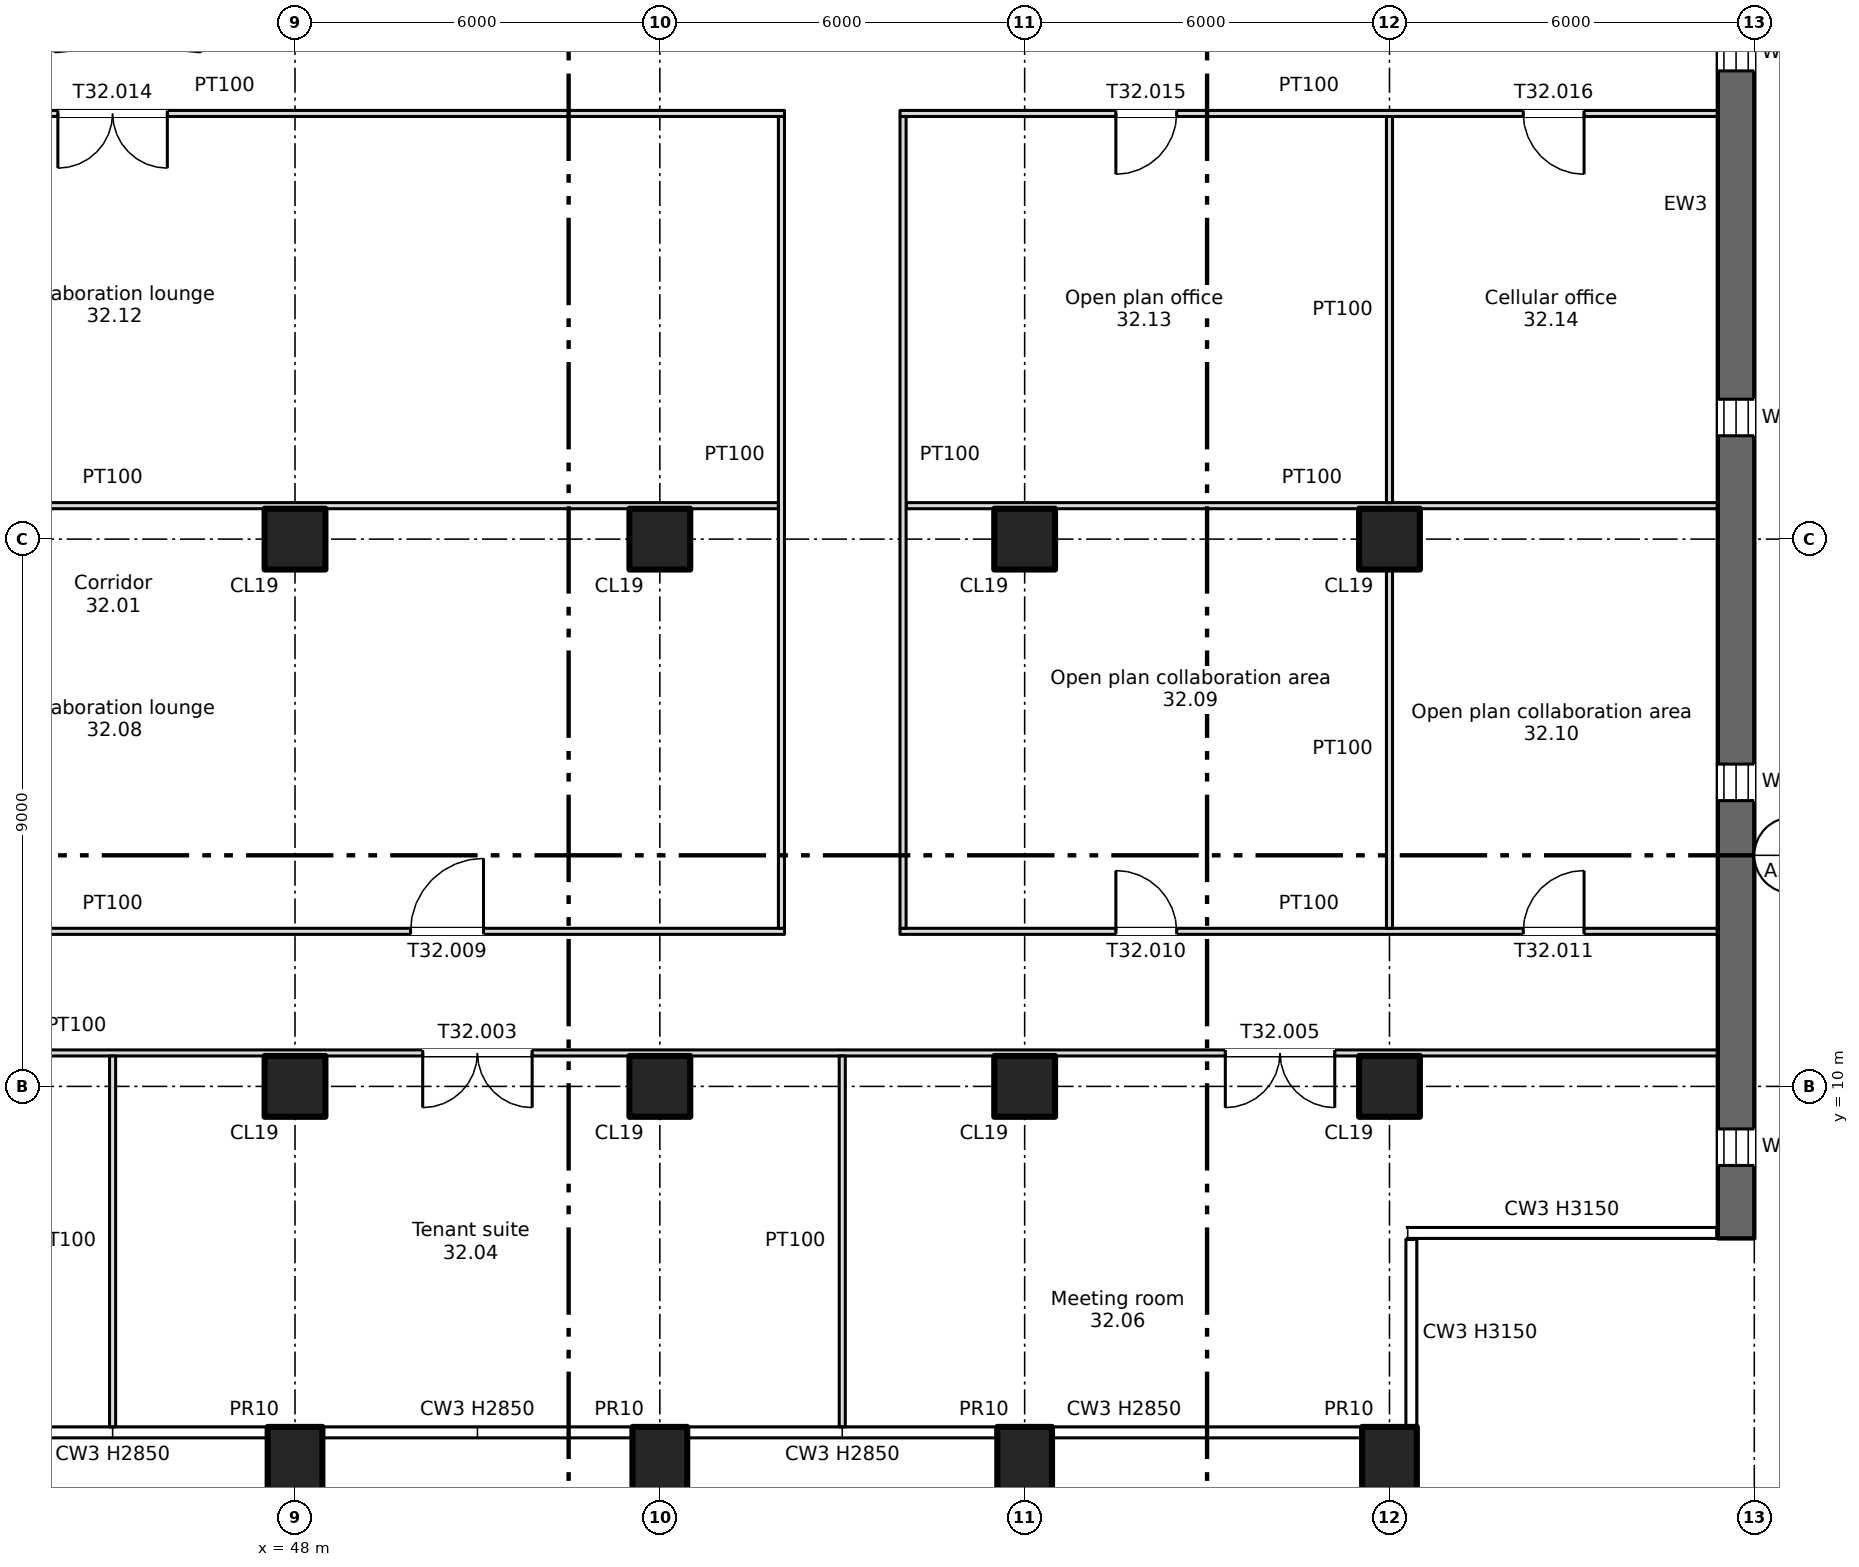
"""IFC4 building model, lengths in metres.
Left out: names, types, materials, properties, quantities, classifications, styles, units other than length and angle.
Written with IfcOpenShell. Run it as: python <this file> out.ifc"""

import sys

from ifc_helpers import new_model, si_unit, direction, frame, frame_2d, origin, origin_2d, place, context, subcontext, project, spatial, rectangle, extrude, element, fill, save


model = new_model("IFC4")
c1 = context("Model", 3, precision=1e-05, world=origin(), true_north=direction((0.0, 1.0)))
c2 = subcontext(c1, "Body", "Model", "MODEL_VIEW")
j1 = project(units=[si_unit("LENGTHUNIT", "METRE"), si_unit("PLANEANGLEUNIT", "RADIAN")], contexts=[c1])
p1 = place(None, origin())
s1 = spatial("IfcSite", under=j1, at=p1, CompositionType="ELEMENT")
p2 = place(p1, origin())
s2 = spatial("IfcBuilding", under=s1, at=p2, CompositionType="ELEMENT")
p3 = place(p2, frame((0.0, 0.0, 223.0)))
s3 = spatial("IfcBuildingStorey", under=s2, at=p3, CompositionType="ELEMENT", Elevation=223.0)
for number, where, z_axis, x_axis in (
    (1, (48.0, 3.7, -0.4), (0.0, 0.0, 1.0), (1.0, 0.0, 0.0)),
    (2, (54.0, 3.7, -0.4), (0.0, 0.0, 1.0), (1.0, 0.0, 0.0)),
    (3, (60.0, 3.7, -0.4), (0.0, 0.0, 1.0), (1.0, 0.0, 0.0)),
    (4, (66.0, 3.7, -0.4), (0.0, 0.0, 1.0), (1.0, 0.0, 0.0)),
):
    element("IfcColumn", number, at=place(p3, frame(where, z_axis=z_axis, x_axis=x_axis)), inside=s3, PredefinedType="COLUMN", context=c2, shape_type="SweptSolid", body=[
        extrude(rectangle(XDim=0.9, YDim=1.4, at=origin_2d()), origin(), (0.0, 0.0, 1.0), 3.55),
    ])
for number, where, z_axis, x_axis in (
    (5, (48.0, 10.0, 0.0), (0.0, 0.0, 1.0), (1.0, 0.0, 0.0)),
    (6, (48.0, 19.0, 0.0), (0.0, 0.0, 1.0), (1.0, 0.0, 0.0)),
    (7, (54.0, 10.0, 0.0), (0.0, 0.0, 1.0), (1.0, 0.0, 0.0)),
    (8, (54.0, 19.0, 0.0), (0.0, 0.0, 1.0), (1.0, 0.0, 0.0)),
    (9, (60.0, 10.0, 0.0), (0.0, 0.0, 1.0), (1.0, 0.0, 0.0)),
    (10, (60.0, 19.0, 0.0), (0.0, 0.0, 1.0), (1.0, 0.0, 0.0)),
    (11, (66.0, 10.0, 0.0), (0.0, 0.0, 1.0), (1.0, 0.0, 0.0)),
    (12, (66.0, 19.0, 0.0), (0.0, 0.0, 1.0), (1.0, 0.0, 0.0)),
):
    element("IfcColumn", number, at=place(p3, frame(where, z_axis=z_axis, x_axis=x_axis)), inside=s3, PredefinedType="COLUMN", context=c2, shape_type="SweptSolid", body=[
        extrude(rectangle(XDim=1.0, YDim=1.0, at=origin_2d()), origin(), (0.0, 0.0, 1.0), 3.15),
    ])
p4 = place(p3, frame((71.7, 7.5, 0.0), z_axis=(0.0, 0.0, 1.0), x_axis=(0.0, 1.0, 0.0)))
e13 = element("IfcWall", 13, at=p4, inside=s3, PredefinedType="SHEAR", context=c2, shape_type="SweptSolid", body=[
    extrude(rectangle(XDim=34.0, YDim=0.6, at=frame_2d((17.0, 0.0))), origin(), (0.0, 0.0, 1.0), 3.15),
])
p5 = place(p4, frame((1.2, 0.0, 0.6)))
e14 = element("IfcOpeningElement", 14, at=p5, cuts=e13, PredefinedType="OPENING", context=c2, shape_type="SweptSolid", body=[
    extrude(rectangle(XDim=0.6, YDim=2.4, at=frame_2d((0.3, 1.2))), frame((0.0, 0.31, 0.0), z_axis=(0.0, -1.0, 0.0), x_axis=(1.0, 0.0, 0.0)), (0.0, 0.0, 1.0), 0.62),
])
p6 = place(p4, frame((7.2, 0.0, 0.6)))
e15 = element("IfcOpeningElement", 15, at=p6, cuts=e13, PredefinedType="OPENING", context=c2, shape_type="SweptSolid", body=[
    extrude(rectangle(XDim=0.6, YDim=2.4, at=frame_2d((0.3, 1.2))), frame((0.0, 0.31, 0.0), z_axis=(0.0, -1.0, 0.0), x_axis=(1.0, 0.0, 0.0)), (0.0, 0.0, 1.0), 0.62),
])
p7 = place(p4, frame((13.2, 0.0, 0.6)))
e16 = element("IfcOpeningElement", 16, at=p7, cuts=e13, PredefinedType="OPENING", context=c2, shape_type="SweptSolid", body=[
    extrude(rectangle(XDim=0.6, YDim=2.4, at=frame_2d((0.3, 1.2))), frame((0.0, 0.31, 0.0), z_axis=(0.0, -1.0, 0.0), x_axis=(1.0, 0.0, 0.0)), (0.0, 0.0, 1.0), 0.62),
])
p8 = place(p4, frame((19.2, 0.0, 0.6)))
e17 = element("IfcOpeningElement", 17, at=p8, cuts=e13, PredefinedType="OPENING", context=c2, shape_type="SweptSolid", body=[
    extrude(rectangle(XDim=0.6, YDim=2.4, at=frame_2d((0.3, 1.2))), frame((0.0, 0.31, 0.0), z_axis=(0.0, -1.0, 0.0), x_axis=(1.0, 0.0, 0.0)), (0.0, 0.0, 1.0), 0.62),
])
p9 = place(p4, frame((25.2, 0.0, 0.6)))
e18 = element("IfcOpeningElement", 18, at=p9, cuts=e13, PredefinedType="OPENING", context=c2, shape_type="SweptSolid", body=[
    extrude(rectangle(XDim=0.6, YDim=2.4, at=frame_2d((0.3, 1.2))), frame((0.0, 0.31, 0.0), z_axis=(0.0, -1.0, 0.0), x_axis=(1.0, 0.0, 0.0)), (0.0, 0.0, 1.0), 0.62),
])
p10 = place(p4, frame((31.2, 0.0, 0.6)))
e19 = element("IfcOpeningElement", 19, at=p10, cuts=e13, PredefinedType="OPENING", context=c2, shape_type="SweptSolid", body=[
    extrude(rectangle(XDim=0.6, YDim=2.4, at=frame_2d((0.3, 1.2))), frame((0.0, 0.31, 0.0), z_axis=(0.0, -1.0, 0.0), x_axis=(1.0, 0.0, 0.0)), (0.0, 0.0, 1.0), 0.62),
])
p11 = place(p3, frame((6.6, 10.55, 0.0), z_axis=(0.0, 0.0, 1.0), x_axis=(1.0, 0.0, 0.0)))
e20 = element("IfcWall", 20, at=p11, inside=s3, PredefinedType="PARTITIONING", context=c2, shape_type="SweptSolid", body=[
    extrude(rectangle(XDim=64.8, YDim=0.1, at=frame_2d((32.4, 0.0))), origin(), (0.0, 0.0, 1.0), 3.15),
])
p12 = place(p11, frame((19.5, 0.0, 0.0)))
e21 = element("IfcOpeningElement", 21, at=p12, cuts=e20, PredefinedType="OPENING", context=c2, shape_type="SweptSolid", body=[
    extrude(rectangle(XDim=1.8, YDim=2.1, at=frame_2d((0.9, 1.05))), frame((0.0, 0.06, 0.0), z_axis=(0.0, -1.0, 0.0), x_axis=(1.0, 0.0, 0.0)), (0.0, 0.0, 1.0), 0.12),
])
p13 = place(p11, frame((31.5, 0.0, 0.0)))
e22 = element("IfcOpeningElement", 22, at=p13, cuts=e20, PredefinedType="OPENING", context=c2, shape_type="SweptSolid", body=[
    extrude(rectangle(XDim=1.8, YDim=2.1, at=frame_2d((0.9, 1.05))), frame((0.0, 0.06, 0.0), z_axis=(0.0, -1.0, 0.0), x_axis=(1.0, 0.0, 0.0)), (0.0, 0.0, 1.0), 0.12),
])
p14 = place(p11, frame((43.5, 0.0, 0.0)))
e23 = element("IfcOpeningElement", 23, at=p14, cuts=e20, PredefinedType="OPENING", context=c2, shape_type="SweptSolid", body=[
    extrude(rectangle(XDim=1.8, YDim=2.1, at=frame_2d((0.9, 1.05))), frame((0.0, 0.06, 0.0), z_axis=(0.0, -1.0, 0.0), x_axis=(1.0, 0.0, 0.0)), (0.0, 0.0, 1.0), 0.12),
])
p15 = place(p11, frame((6.3, 0.0, 0.0)))
e24 = element("IfcOpeningElement", 24, at=p15, cuts=e20, PredefinedType="OPENING", context=c2, shape_type="SweptSolid", body=[
    extrude(rectangle(XDim=1.8, YDim=2.1, at=frame_2d((0.9, 1.05))), frame((0.0, 0.06, 0.0), z_axis=(0.0, -1.0, 0.0), x_axis=(1.0, 0.0, 0.0)), (0.0, 0.0, 1.0), 0.12),
])
p16 = place(p11, frame((56.7, 0.0, 0.0)))
e25 = element("IfcOpeningElement", 25, at=p16, cuts=e20, PredefinedType="OPENING", context=c2, shape_type="SweptSolid", body=[
    extrude(rectangle(XDim=1.8, YDim=2.1, at=frame_2d((0.9, 1.05))), frame((0.0, 0.06, 0.0), z_axis=(0.0, -1.0, 0.0), x_axis=(1.0, 0.0, 0.0)), (0.0, 0.0, 1.0), 0.12),
])
p17 = place(p3, frame((33.95, 12.55, 0.0), z_axis=(0.0, 0.0, 1.0), x_axis=(1.0, 0.0, 0.0)))
e26 = element("IfcWall", 26, at=p17, inside=s3, PredefinedType="PARTITIONING", context=c2, shape_type="SweptSolid", body=[
    extrude(rectangle(XDim=22.1, YDim=0.1, at=frame_2d((11.05, 0.0))), origin(), (0.0, 0.0, 1.0), 3.15),
])
p18 = place(p17, frame((4.95, 0.0, 0.0)))
e27 = element("IfcOpeningElement", 27, at=p18, cuts=e26, PredefinedType="OPENING", context=c2, shape_type="SweptSolid", body=[
    extrude(rectangle(XDim=1.2, YDim=2.1, at=frame_2d((0.6, 1.05))), frame((0.0, 0.06, 0.0), z_axis=(0.0, -1.0, 0.0), x_axis=(1.0, 0.0, 0.0)), (0.0, 0.0, 1.0), 0.12),
])
p19 = place(p17, frame((15.95, 0.0, 0.0)))
e28 = element("IfcOpeningElement", 28, at=p19, cuts=e26, PredefinedType="OPENING", context=c2, shape_type="SweptSolid", body=[
    extrude(rectangle(XDim=1.2, YDim=2.1, at=frame_2d((0.6, 1.05))), frame((0.0, 0.06, 0.0), z_axis=(0.0, -1.0, 0.0), x_axis=(1.0, 0.0, 0.0)), (0.0, 0.0, 1.0), 0.12),
])
p20 = place(p3, frame((57.95, 12.55, 0.0), z_axis=(0.0, 0.0, 1.0), x_axis=(1.0, 0.0, 0.0)))
e29 = element("IfcWall", 29, at=p20, inside=s3, PredefinedType="PARTITIONING", context=c2, shape_type="SweptSolid", body=[
    extrude(rectangle(XDim=13.45, YDim=0.1, at=frame_2d((6.725, 0.0))), origin(), (0.0, 0.0, 1.0), 3.15),
])
p21 = place(p20, frame((3.55, 0.0, 0.0)))
e30 = element("IfcOpeningElement", 30, at=p21, cuts=e29, PredefinedType="OPENING", context=c2, shape_type="SweptSolid", body=[
    extrude(rectangle(XDim=1.0, YDim=2.1, at=frame_2d((0.5, 1.05))), frame((0.0, 0.06, 0.0), z_axis=(0.0, -1.0, 0.0), x_axis=(1.0, 0.0, 0.0)), (0.0, 0.0, 1.0), 0.12),
])
p22 = place(p20, frame((10.25, 0.0, 0.0)))
e31 = element("IfcOpeningElement", 31, at=p22, cuts=e29, PredefinedType="OPENING", context=c2, shape_type="SweptSolid", body=[
    extrude(rectangle(XDim=1.0, YDim=2.1, at=frame_2d((0.5, 1.05))), frame((0.0, 0.06, 0.0), z_axis=(0.0, -1.0, 0.0), x_axis=(1.0, 0.0, 0.0)), (0.0, 0.0, 1.0), 0.12),
])
p23 = place(p3, frame((34.05, 19.55, 0.0), z_axis=(0.0, 0.0, 1.0), x_axis=(1.0, 0.0, 0.0)))
e32 = element("IfcWall", 32, at=p23, inside=s3, PredefinedType="PARTITIONING", context=c2, shape_type="SweptSolid", body=[
    extrude(rectangle(XDim=21.9, YDim=0.1, at=frame_2d((10.95, 0.0))), origin(), (0.0, 0.0, 1.0), 3.15),
])
p24 = place(p3, frame((58.05, 19.55, 0.0), z_axis=(0.0, 0.0, 1.0), x_axis=(1.0, 0.0, 0.0)))
e33 = element("IfcWall", 33, at=p24, inside=s3, PredefinedType="PARTITIONING", context=c2, shape_type="SweptSolid", body=[
    extrude(rectangle(XDim=13.35, YDim=0.1, at=frame_2d((6.675, 0.0))), origin(), (0.0, 0.0, 1.0), 3.15),
])
p25 = place(p3, frame((33.95, 26.0, 0.0), z_axis=(0.0, 0.0, 1.0), x_axis=(1.0, 0.0, 0.0)))
e34 = element("IfcWall", 34, at=p25, inside=s3, PredefinedType="PARTITIONING", context=c2, shape_type="SweptSolid", body=[
    extrude(rectangle(XDim=22.1, YDim=0.1, at=frame_2d((11.05, 0.0))), origin(), (0.0, 0.0, 1.0), 3.15),
])
p26 = place(p25, frame((10.15, 0.0, 0.0)))
e35 = element("IfcOpeningElement", 35, at=p26, cuts=e34, PredefinedType="OPENING", context=c2, shape_type="SweptSolid", body=[
    extrude(rectangle(XDim=1.8, YDim=2.1, at=frame_2d((0.9, 1.05))), frame((0.0, 0.06, 0.0), z_axis=(0.0, -1.0, 0.0), x_axis=(1.0, 0.0, 0.0)), (0.0, 0.0, 1.0), 0.12),
])
p27 = place(p3, frame((57.95, 26.0, 0.0), z_axis=(0.0, 0.0, 1.0), x_axis=(1.0, 0.0, 0.0)))
e36 = element("IfcWall", 36, at=p27, inside=s3, PredefinedType="PARTITIONING", context=c2, shape_type="SweptSolid", body=[
    extrude(rectangle(XDim=13.45, YDim=0.1, at=frame_2d((6.725, 0.0))), origin(), (0.0, 0.0, 1.0), 3.15),
])
p28 = place(p27, frame((3.55, 0.0, 0.0)))
e37 = element("IfcOpeningElement", 37, at=p28, cuts=e36, PredefinedType="OPENING", context=c2, shape_type="SweptSolid", body=[
    extrude(rectangle(XDim=1.0, YDim=2.1, at=frame_2d((0.5, 1.05))), frame((0.0, 0.06, 0.0), z_axis=(0.0, -1.0, 0.0), x_axis=(1.0, 0.0, 0.0)), (0.0, 0.0, 1.0), 0.12),
])
p29 = place(p27, frame((10.25, 0.0, 0.0)))
e38 = element("IfcOpeningElement", 38, at=p29, cuts=e36, PredefinedType="OPENING", context=c2, shape_type="SweptSolid", body=[
    extrude(rectangle(XDim=1.0, YDim=2.1, at=frame_2d((0.5, 1.05))), frame((0.0, 0.06, 0.0), z_axis=(0.0, -1.0, 0.0), x_axis=(1.0, 0.0, 0.0)), (0.0, 0.0, 1.0), 0.12),
])
p30 = place(p3, frame((45.0, 4.4, 0.0), z_axis=(0.0, 0.0, 1.0), x_axis=(0.0, 1.0, 0.0)))
e39 = element("IfcWall", 39, at=p30, inside=s3, PredefinedType="PARTITIONING", context=c2, shape_type="SweptSolid", body=[
    extrude(rectangle(XDim=6.1, YDim=0.1, at=frame_2d((3.05, 0.0))), origin(), (0.0, 0.0, 1.0), 3.15),
])
p31 = place(p3, frame((56.0, 12.6, 0.0), z_axis=(0.0, 0.0, 1.0), x_axis=(0.0, 1.0, 0.0)))
e40 = element("IfcWall", 40, at=p31, inside=s3, PredefinedType="PARTITIONING", context=c2, shape_type="SweptSolid", body=[
    extrude(rectangle(XDim=13.35, YDim=0.1, at=frame_2d((6.675, 0.0))), origin(), (0.0, 0.0, 1.0), 3.15),
])
p32 = place(p3, frame((57.0, 4.4, 0.0), z_axis=(0.0, 0.0, 1.0), x_axis=(0.0, 1.0, 0.0)))
e41 = element("IfcWall", 41, at=p32, inside=s3, PredefinedType="PARTITIONING", context=c2, shape_type="SweptSolid", body=[
    extrude(rectangle(XDim=6.1, YDim=0.1, at=frame_2d((3.05, 0.0))), origin(), (0.0, 0.0, 1.0), 3.15),
])
p33 = place(p3, frame((58.0, 12.6, 0.0), z_axis=(0.0, 0.0, 1.0), x_axis=(0.0, 1.0, 0.0)))
e42 = element("IfcWall", 42, at=p33, inside=s3, PredefinedType="PARTITIONING", context=c2, shape_type="SweptSolid", body=[
    extrude(rectangle(XDim=13.35, YDim=0.1, at=frame_2d((6.675, 0.0))), origin(), (0.0, 0.0, 1.0), 3.15),
])
p34 = place(p3, frame((66.0, 12.6, 0.0), z_axis=(0.0, 0.0, 1.0), x_axis=(0.0, 1.0, 0.0)))
e43 = element("IfcWall", 43, at=p34, inside=s3, PredefinedType="PARTITIONING", context=c2, shape_type="SweptSolid", body=[
    extrude(rectangle(XDim=5.9, YDim=0.1, at=frame_2d((2.95, 0.0))), origin(), (0.0, 0.0, 1.0), 3.15),
])
p35 = place(p3, frame((66.0, 19.6, 0.0), z_axis=(0.0, 0.0, 1.0), x_axis=(0.0, 1.0, 0.0)))
e44 = element("IfcWall", 44, at=p35, inside=s3, PredefinedType="PARTITIONING", context=c2, shape_type="SweptSolid", body=[
    extrude(rectangle(XDim=6.35, YDim=0.1, at=frame_2d((3.175, 0.0))), origin(), (0.0, 0.0, 1.0), 3.15),
])
p36 = place(p5, origin())
e45 = element("IfcWindow", 45, at=p36, inside=s3, PartitioningType="SINGLE_PANEL", PredefinedType="WINDOW", context=c2, shape_type="SweptSolid", body=[
    extrude(rectangle(XDim=0.6, YDim=2.4, at=frame_2d((0.3, 1.2))), frame((0.0, 0.03, 0.0), z_axis=(0.0, -1.0, 0.0), x_axis=(1.0, 0.0, 0.0)), (0.0, 0.0, 1.0), 0.06),
])
fill(e14, e45)
p37 = place(p6, origin())
e46 = element("IfcWindow", 46, at=p37, inside=s3, PartitioningType="SINGLE_PANEL", PredefinedType="WINDOW", context=c2, shape_type="SweptSolid", body=[
    extrude(rectangle(XDim=0.6, YDim=2.4, at=frame_2d((0.3, 1.2))), frame((0.0, 0.03, 0.0), z_axis=(0.0, -1.0, 0.0), x_axis=(1.0, 0.0, 0.0)), (0.0, 0.0, 1.0), 0.06),
])
fill(e15, e46)
p38 = place(p7, origin())
e47 = element("IfcWindow", 47, at=p38, inside=s3, PartitioningType="SINGLE_PANEL", PredefinedType="WINDOW", context=c2, shape_type="SweptSolid", body=[
    extrude(rectangle(XDim=0.6, YDim=2.4, at=frame_2d((0.3, 1.2))), frame((0.0, 0.03, 0.0), z_axis=(0.0, -1.0, 0.0), x_axis=(1.0, 0.0, 0.0)), (0.0, 0.0, 1.0), 0.06),
])
fill(e16, e47)
p39 = place(p8, origin())
e48 = element("IfcWindow", 48, at=p39, inside=s3, PartitioningType="SINGLE_PANEL", PredefinedType="WINDOW", context=c2, shape_type="SweptSolid", body=[
    extrude(rectangle(XDim=0.6, YDim=2.4, at=frame_2d((0.3, 1.2))), frame((0.0, 0.03, 0.0), z_axis=(0.0, -1.0, 0.0), x_axis=(1.0, 0.0, 0.0)), (0.0, 0.0, 1.0), 0.06),
])
fill(e17, e48)
p40 = place(p14, origin())
e49 = element("IfcDoor", 49, at=p40, inside=s3, OperationType="DOUBLE_DOOR_SINGLE_SWING", PredefinedType="DOOR", context=c2, shape_type="SweptSolid", body=[
    extrude(rectangle(XDim=1.8, YDim=2.1, at=frame_2d((0.9, 1.05))), frame((0.0, 0.025, 0.0), z_axis=(0.0, -1.0, 0.0), x_axis=(1.0, 0.0, 0.0)), (0.0, 0.0, 1.0), 0.05),
])
fill(e23, e49)
p41 = place(p16, origin())
e50 = element("IfcDoor", 50, at=p41, inside=s3, OperationType="DOUBLE_DOOR_SINGLE_SWING", PredefinedType="DOOR", context=c2, shape_type="SweptSolid", body=[
    extrude(rectangle(XDim=1.8, YDim=2.1, at=frame_2d((0.9, 1.05))), frame((0.0, 0.025, 0.0), z_axis=(0.0, -1.0, 0.0), x_axis=(1.0, 0.0, 0.0)), (0.0, 0.0, 1.0), 0.05),
])
fill(e25, e50)
p42 = place(p19, origin())
e51 = element("IfcDoor", 51, at=p42, inside=s3, OperationType="SINGLE_SWING_RIGHT", PredefinedType="DOOR", context=c2, shape_type="SweptSolid", body=[
    extrude(rectangle(XDim=1.2, YDim=2.1, at=frame_2d((0.6, 1.05))), frame((0.0, 0.025, 0.0), z_axis=(0.0, -1.0, 0.0), x_axis=(1.0, 0.0, 0.0)), (0.0, 0.0, 1.0), 0.05),
])
fill(e28, e51)
p43 = place(p21, origin())
e52 = element("IfcDoor", 52, at=p43, inside=s3, OperationType="SINGLE_SWING_LEFT", PredefinedType="DOOR", context=c2, shape_type="SweptSolid", body=[
    extrude(rectangle(XDim=1.0, YDim=2.1, at=frame_2d((0.5, 1.05))), frame((0.0, 0.025, 0.0), z_axis=(0.0, -1.0, 0.0), x_axis=(1.0, 0.0, 0.0)), (0.0, 0.0, 1.0), 0.05),
])
fill(e30, e52)
p44 = place(p22, origin())
e53 = element("IfcDoor", 53, at=p44, inside=s3, OperationType="SINGLE_SWING_RIGHT", PredefinedType="DOOR", context=c2, shape_type="SweptSolid", body=[
    extrude(rectangle(XDim=1.0, YDim=2.1, at=frame_2d((0.5, 1.05))), frame((0.0, 0.025, 0.0), z_axis=(0.0, -1.0, 0.0), x_axis=(1.0, 0.0, 0.0)), (0.0, 0.0, 1.0), 0.05),
])
fill(e31, e53)
p45 = place(p26, origin())
e54 = element("IfcDoor", 54, at=p45, inside=s3, OperationType="DOUBLE_DOOR_SINGLE_SWING", PredefinedType="DOOR", context=c2, shape_type="SweptSolid", body=[
    extrude(rectangle(XDim=1.8, YDim=2.1, at=frame_2d((0.9, 1.05))), frame((0.0, 0.025, 0.0), z_axis=(0.0, -1.0, 0.0), x_axis=(1.0, 0.0, 0.0)), (0.0, 0.0, 1.0), 0.05),
])
fill(e35, e54)
p46 = place(p28, origin())
e55 = element("IfcDoor", 55, at=p46, inside=s3, OperationType="SINGLE_SWING_LEFT", PredefinedType="DOOR", context=c2, shape_type="SweptSolid", body=[
    extrude(rectangle(XDim=1.0, YDim=2.1, at=frame_2d((0.5, 1.05))), frame((0.0, 0.025, 0.0), z_axis=(0.0, -1.0, 0.0), x_axis=(1.0, 0.0, 0.0)), (0.0, 0.0, 1.0), 0.05),
])
fill(e37, e55)
p47 = place(p29, origin())
e56 = element("IfcDoor", 56, at=p47, inside=s3, OperationType="SINGLE_SWING_RIGHT", PredefinedType="DOOR", context=c2, shape_type="SweptSolid", body=[
    extrude(rectangle(XDim=1.0, YDim=2.1, at=frame_2d((0.5, 1.05))), frame((0.0, 0.025, 0.0), z_axis=(0.0, -1.0, 0.0), x_axis=(1.0, 0.0, 0.0)), (0.0, 0.0, 1.0), 0.05),
])
fill(e38, e56)
save(model, sys.argv[1])
